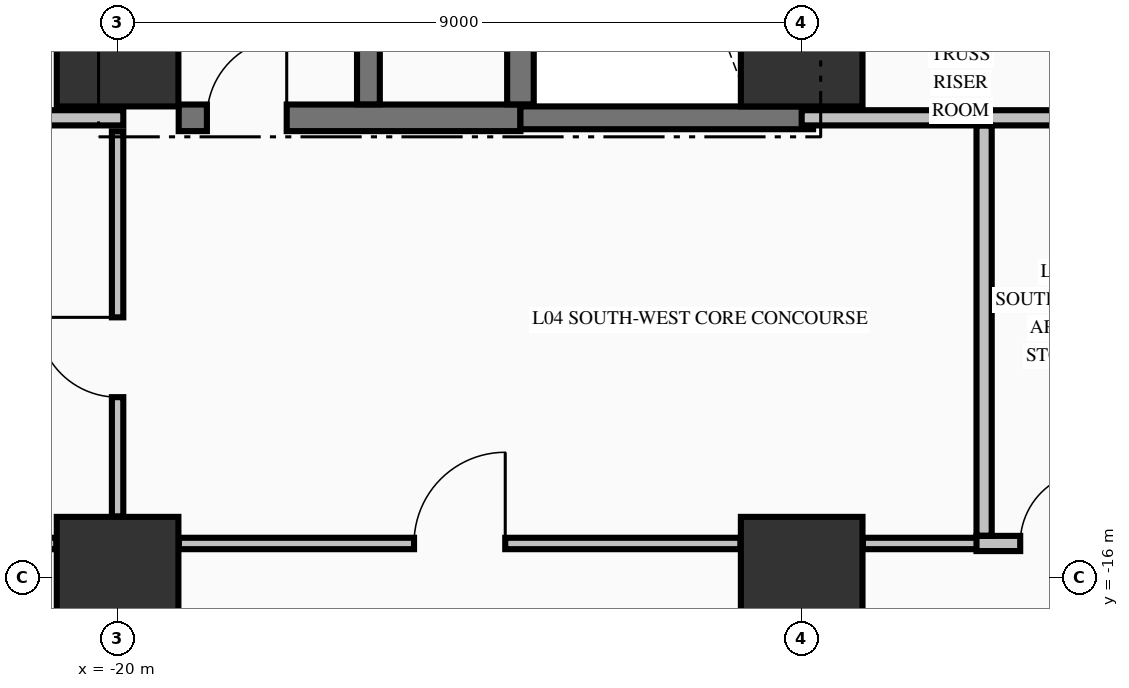
"""IFC4 building model, lengths in metres.
Left out: names, types, materials, properties, quantities, classifications, styles, units other than length and angle.
Written with IfcOpenShell. Run it as: python <this file> out.ifc"""

import sys

from ifc_helpers import new_model, si_unit, direction, frame, frame_2d, origin, origin_2d, place, context, subcontext, project, spatial, rectangle, extrude, element, fill, save


model = new_model("IFC4")
c1 = context("Model", 3, precision=1e-05, world=origin(), true_north=direction((0.0, 1.0)))
c2 = subcontext(c1, "Body", "Model", "MODEL_VIEW")
j1 = project(units=[si_unit("LENGTHUNIT", "METRE"), si_unit("PLANEANGLEUNIT", "RADIAN")], contexts=[c1])
p1 = place(None, origin())
s1 = spatial("IfcSite", under=j1, at=p1, CompositionType="ELEMENT")
p2 = place(p1, origin())
s2 = spatial("IfcBuilding", under=s1, at=p2, CompositionType="ELEMENT")
p3 = place(p2, frame((0.0, 0.0, 21.76)))
s3 = spatial("IfcBuildingStorey", under=s2, at=p3, CompositionType="ELEMENT", Elevation=21.76)
for number, where, z_axis, x_axis in (
    (1, (-20.0, -16.0, -0.45), (0.0, 0.0, 1.0), (1.0, 0.0, 0.0)),
    (2, (-20.0, -9.0, -0.45), (0.0, 0.0, 1.0), (1.0, 0.0, 0.0)),
    (3, (-11.0, -16.0, -0.45), (0.0, 0.0, 1.0), (1.0, 0.0, 0.0)),
    (4, (-11.0, -9.0, -0.45), (0.0, 0.0, 1.0), (1.0, 0.0, 0.0)),
):
    element("IfcColumn", number, at=place(p3, frame(where, z_axis=z_axis, x_axis=x_axis)), inside=s3, PredefinedType="COLUMN", context=c2, shape_type="SweptSolid", body=[
        extrude(rectangle(XDim=1.6, YDim=1.6, at=origin_2d()), origin(), (0.0, 0.0, 1.0), 5.44),
    ])
p4 = place(p3, frame((-19.196, -9.95, 0.0), z_axis=(0.0, 0.0, 1.0), x_axis=(1.0, 0.0, 0.0)))
e5 = element("IfcWall", 5, at=p4, inside=s3, PredefinedType="SHEAR", context=c2, shape_type="SweptSolid", body=[
    extrude(rectangle(XDim=4.496, YDim=0.35, at=frame_2d((2.248, 0.0))), origin(), (0.0, 0.0, 1.0), 4.99),
])
p5 = place(p4, frame((0.371, 0.0, 0.0)))
e6 = element("IfcOpeningElement", 6, at=p5, cuts=e5, PredefinedType="OPENING", context=c2, shape_type="SweptSolid", body=[
    extrude(rectangle(XDim=1.05, YDim=2.15, at=frame_2d((0.525, 1.075))), frame((0.0, 0.185, 0.0), z_axis=(0.0, -1.0, 0.0), x_axis=(1.0, 0.0, 0.0)), (0.0, 0.0, 1.0), 0.37),
])
p6 = place(p3, frame((-14.7, -9.95, 0.0), z_axis=(0.0, 0.0, 1.0), x_axis=(1.0, 0.0, 0.0)))
e7 = element("IfcWall", 7, at=p6, inside=s3, PredefinedType="SHEAR", context=c2, shape_type="SweptSolid", body=[
    extrude(rectangle(XDim=3.85, YDim=0.3, at=frame_2d((1.925, 0.0))), origin(), (0.0, 0.0, 1.0), 4.99),
])
p7 = place(p3, frame((-25.294, -15.55, 0.0), z_axis=(0.0, 0.0, 1.0), x_axis=(1.0, 0.0, 0.0)))
e8 = element("IfcWall", 8, at=p7, inside=s3, PredefinedType="PARTITIONING", context=c2, shape_type="SweptSolid", body=[
    extrude(rectangle(XDim=4.488, YDim=0.15, at=frame_2d((2.244, 0.0))), origin(), (0.0, 0.0, 1.0), 3.332),
])
p8 = place(p7, frame((0.619, 0.0, 0.0)))
e9 = element("IfcOpeningElement", 9, at=p8, cuts=e8, PredefinedType="OPENING", context=c2, shape_type="SweptSolid", body=[
    extrude(rectangle(XDim=0.95, YDim=2.15, at=frame_2d((0.475, 1.075))), frame((0.0, 0.085, 0.0), z_axis=(0.0, -1.0, 0.0), x_axis=(1.0, 0.0, 0.0)), (0.0, 0.0, 1.0), 0.17),
])
p9 = place(p3, frame((-19.194, -15.55, 0.0), z_axis=(0.0, 0.0, 1.0), x_axis=(1.0, 0.0, 0.0)))
e10 = element("IfcWall", 10, at=p9, inside=s3, PredefinedType="PARTITIONING", context=c2, shape_type="SweptSolid", body=[
    extrude(rectangle(XDim=7.388, YDim=0.15, at=frame_2d((3.694, 0.0))), origin(), (0.0, 0.0, 1.0), 3.332),
])
p10 = place(p9, frame((3.094, 0.0, 0.0)))
e11 = element("IfcOpeningElement", 11, at=p10, cuts=e10, PredefinedType="OPENING", context=c2, shape_type="SweptSolid", body=[
    extrude(rectangle(XDim=1.2, YDim=2.15, at=frame_2d((0.6, 1.075))), frame((0.0, 0.085, 0.0), z_axis=(0.0, -1.0, 0.0), x_axis=(1.0, 0.0, 0.0)), (0.0, 0.0, 1.0), 0.17),
])
p11 = place(p3, frame((-10.194, -15.55, 0.0), z_axis=(0.0, 0.0, 1.0), x_axis=(1.0, 0.0, 0.0)))
e12 = element("IfcWall", 12, at=p11, inside=s3, PredefinedType="PARTITIONING", context=c2, shape_type="SweptSolid", body=[
    extrude(rectangle(XDim=1.694, YDim=0.15, at=frame_2d((0.847, 0.0))), origin(), (0.0, 0.0, 1.0), 3.332),
])
p12 = place(p3, frame((-8.7, -15.55, 0.0), z_axis=(0.0, 0.0, 1.0), x_axis=(1.0, 0.0, 0.0)))
e13 = element("IfcWall", 13, at=p12, inside=s3, PredefinedType="PARTITIONING", context=c2, shape_type="SweptSolid", body=[
    extrude(rectangle(XDim=2.1, YDim=0.2, at=frame_2d((1.05, 0.0))), origin(), (0.0, 0.0, 1.0), 3.332),
])
p13 = place(p12, frame((0.575, 0.0, 0.0)))
e14 = element("IfcOpeningElement", 14, at=p13, cuts=e13, PredefinedType="OPENING", context=c2, shape_type="SweptSolid", body=[
    extrude(rectangle(XDim=0.95, YDim=2.15, at=frame_2d((0.475, 1.075))), frame((0.0, 0.11, 0.0), z_axis=(0.0, -1.0, 0.0), x_axis=(1.0, 0.0, 0.0)), (0.0, 0.0, 1.0), 0.22),
])
p14 = place(p3, frame((-22.475, -9.95, 0.0), z_axis=(0.0, 0.0, 1.0), x_axis=(1.0, 0.0, 0.0)))
e15 = element("IfcWall", 15, at=p14, inside=s3, PredefinedType="PARTITIONING", context=c2, shape_type="SweptSolid", body=[
    extrude(rectangle(XDim=2.55, YDim=0.2, at=frame_2d((1.275, 0.0))), origin(), (0.0, 0.0, 1.0), 4.99),
])
p15 = place(p14, frame((0.455, 0.0, 0.0)))
e16 = element("IfcOpeningElement", 16, at=p15, cuts=e15, PredefinedType="OPENING", context=c2, shape_type="SweptSolid", body=[
    extrude(rectangle(XDim=1.0, YDim=2.15, at=frame_2d((0.5, 1.075))), frame((0.0, 0.11, 0.0), z_axis=(0.0, -1.0, 0.0), x_axis=(1.0, 0.0, 0.0)), (0.0, 0.0, 1.0), 0.22),
])
p16 = place(p3, frame((-11.0, -9.95, 0.0), z_axis=(0.0, 0.0, 1.0), x_axis=(1.0, 0.0, 0.0)))
e17 = element("IfcWall", 17, at=p16, inside=s3, PredefinedType="PARTITIONING", context=c2, shape_type="SweptSolid", body=[
    extrude(rectangle(XDim=4.4, YDim=0.2, at=frame_2d((2.2, 0.0))), origin(), (0.0, 0.0, 1.0), 3.332),
])
p17 = place(p3, frame((-16.7, -9.773, 0.0), z_axis=(0.0, 0.0, 1.0), x_axis=(0.0, 1.0, 0.0)))
e18 = element("IfcWall", 18, at=p17, inside=s3, PredefinedType="SHEAR", context=c2, shape_type="SweptSolid", body=[
    extrude(rectangle(XDim=9.371, YDim=0.3, at=frame_2d((4.686, 0.0))), origin(), (0.0, 0.0, 1.0), 4.99),
])
p18 = place(p3, frame((-14.7, -9.773, 0.0), z_axis=(0.0, 0.0, 1.0), x_axis=(0.0, 1.0, 0.0)))
e19 = element("IfcWall", 19, at=p18, inside=s3, PredefinedType="SHEAR", context=c2, shape_type="SweptSolid", body=[
    extrude(rectangle(XDim=9.371, YDim=0.35, at=frame_2d((4.686, 0.0))), origin(), (0.0, 0.0, 1.0), 4.99),
])
p19 = place(p3, frame((-20.0, -15.194, 0.0), z_axis=(0.0, 0.0, 1.0), x_axis=(0.0, 1.0, 0.0)))
e20 = element("IfcWall", 20, at=p19, inside=s3, PredefinedType="PARTITIONING", context=c2, shape_type="SweptSolid", body=[
    extrude(rectangle(XDim=5.066, YDim=0.15, at=frame_2d((2.533, 0.0))), origin(), (0.0, 0.0, 1.0), 3.332),
])
p20 = place(p19, frame((1.569, 0.0, 0.0)))
e21 = element("IfcOpeningElement", 21, at=p20, cuts=e20, PredefinedType="OPENING", context=c2, shape_type="SweptSolid", body=[
    extrude(rectangle(XDim=1.05, YDim=2.15, at=frame_2d((0.525, 1.075))), frame((0.0, 0.085, 0.0), z_axis=(0.0, -1.0, 0.0), x_axis=(1.0, 0.0, 0.0)), (0.0, 0.0, 1.0), 0.17),
])
p21 = place(p3, frame((-8.6, -15.447, 0.0), z_axis=(0.0, 0.0, 1.0), x_axis=(0.0, 1.0, 0.0)))
e22 = element("IfcWall", 22, at=p21, inside=s3, PredefinedType="PARTITIONING", context=c2, shape_type="SweptSolid", body=[
    extrude(rectangle(XDim=5.394, YDim=0.2, at=frame_2d((2.697, 0.0))), origin(), (0.0, 0.0, 1.0), 4.99),
])
p22 = place(p5, origin())
e23 = element("IfcDoor", 23, at=p22, inside=s3, OperationType="SINGLE_SWING_RIGHT", PredefinedType="DOOR", context=c2, shape_type="SweptSolid", body=[
    extrude(rectangle(XDim=1.05, YDim=2.15, at=frame_2d((0.525, 1.075))), frame((0.0, 0.025, 0.0), z_axis=(0.0, -1.0, 0.0), x_axis=(1.0, 0.0, 0.0)), (0.0, 0.0, 1.0), 0.05),
])
fill(e6, e23)
p23 = place(p20, origin())
e24 = element("IfcDoor", 24, at=p23, inside=s3, OperationType="SINGLE_SWING_RIGHT", PredefinedType="DOOR", context=c2, shape_type="SweptSolid", body=[
    extrude(rectangle(XDim=1.05, YDim=2.15, at=frame_2d((0.525, 1.075))), frame((0.0, 0.025, 0.0), z_axis=(0.0, -1.0, 0.0), x_axis=(1.0, 0.0, 0.0)), (0.0, 0.0, 1.0), 0.05),
])
fill(e21, e24)
p24 = place(p10, origin())
e25 = element("IfcDoor", 25, at=p24, inside=s3, OperationType="SINGLE_SWING_RIGHT", PredefinedType="DOOR", context=c2, shape_type="SweptSolid", body=[
    extrude(rectangle(XDim=1.2, YDim=2.15, at=frame_2d((0.6, 1.075))), frame((0.0, 0.025, 0.0), z_axis=(0.0, -1.0, 0.0), x_axis=(1.0, 0.0, 0.0)), (0.0, 0.0, 1.0), 0.05),
])
fill(e11, e25)
p25 = place(p13, origin())
e26 = element("IfcDoor", 26, at=p25, inside=s3, OperationType="SINGLE_SWING_RIGHT", PredefinedType="DOOR", context=c2, shape_type="SweptSolid", body=[
    extrude(rectangle(XDim=0.95, YDim=2.15, at=frame_2d((0.475, 1.075))), frame((0.0, 0.025, 0.0), z_axis=(0.0, -1.0, 0.0), x_axis=(1.0, 0.0, 0.0)), (0.0, 0.0, 1.0), 0.05),
])
fill(e14, e26)
save(model, sys.argv[1])
